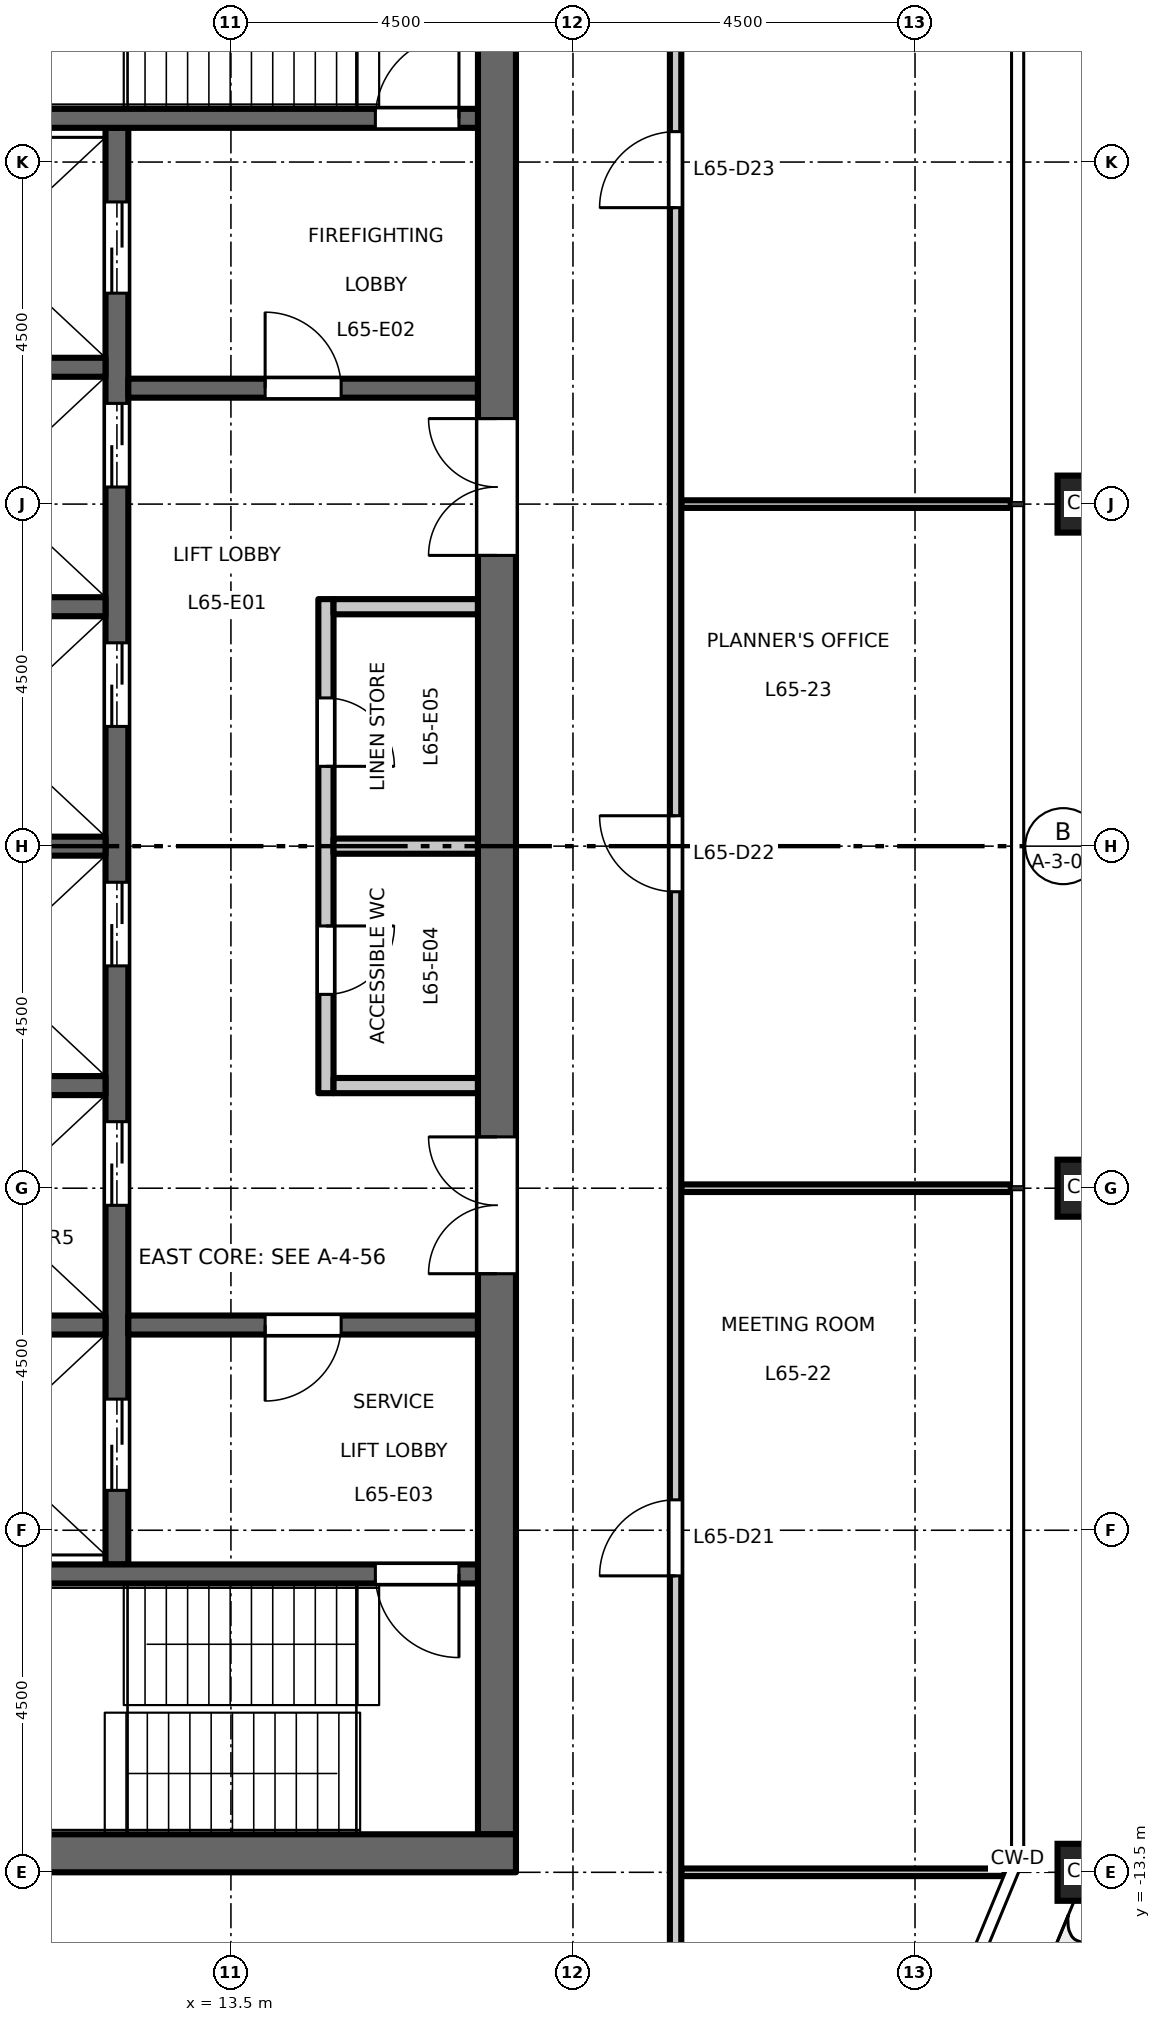
"""IFC4 building model, lengths in metres.
Left out: names, types, materials, properties, quantities, classifications, styles, units other than length and angle.
Written with IfcOpenShell. Run it as: python <this file> out.ifc"""

import sys

from ifc_helpers import new_model, si_unit, direction, frame, frame_2d, origin, origin_2d, place, context, subcontext, project, spatial, rectangle, hollow_rectangle, extrude, element, fill, save


model = new_model("IFC4")
c1 = context("Model", 3, precision=1e-05, world=origin(), true_north=direction((0.0, 1.0)))
c2 = subcontext(c1, "Body", "Model", "MODEL_VIEW")
j1 = project(units=[si_unit("LENGTHUNIT", "METRE"), si_unit("PLANEANGLEUNIT", "RADIAN")], contexts=[c1])
p1 = place(None, origin())
s1 = spatial("IfcSite", under=j1, at=p1, CompositionType="ELEMENT")
p2 = place(p1, origin())
s2 = spatial("IfcBuilding", under=s1, at=p2, CompositionType="ELEMENT")
p3 = place(p2, frame((0.0, 0.0, 303.2)))
s3 = spatial("IfcBuildingStorey", under=s2, at=p3, CompositionType="ELEMENT", Elevation=303.2)
for number, where, z_axis, x_axis in (
    (1, (24.75, -13.5, 0.0), (0.0, 0.0, 1.0), (1.0, 0.0, 0.0)),
    (2, (24.75, -4.5, 0.0), (0.0, 0.0, 1.0), (1.0, 0.0, 0.0)),
    (3, (24.75, 4.5, 0.0), (0.0, 0.0, 1.0), (1.0, 0.0, 0.0)),
):
    element("IfcColumn", number, at=place(p3, frame(where, z_axis=z_axis, x_axis=x_axis)), inside=s3, PredefinedType="COLUMN", context=c2, shape_type="SweptSolid", body=[
        extrude(hollow_rectangle(XDim=0.75, YDim=0.75, WallThickness=0.04, at=origin_2d()), origin(), (0.0, 0.0, 1.0), 4.5),
    ])
p4 = place(p3, frame((14.75, -3.25, 0.0), z_axis=(0.0, 0.0, 1.0), x_axis=(0.0, 1.0, 0.0)))
e4 = element("IfcWall", 4, at=p4, inside=s3, PredefinedType="PARTITIONING", context=c2, shape_type="SweptSolid", body=[
    extrude(rectangle(XDim=6.5, YDim=0.2, at=frame_2d((3.25, 0.0))), origin(), (0.0, 0.0, 1.0), 4.35),
])
p5 = place(p4, frame((1.3, 0.0, 0.0)))
e5 = element("IfcOpeningElement", 5, at=p5, cuts=e4, PredefinedType="OPENING", context=c2, shape_type="SweptSolid", body=[
    extrude(rectangle(XDim=0.9, YDim=2.1, at=frame_2d((0.45, 1.05))), frame((0.0, 0.11, 0.0), z_axis=(0.0, -1.0, 0.0), x_axis=(1.0, 0.0, 0.0)), (0.0, 0.0, 1.0), 0.22),
])
p6 = place(p4, frame((4.3, 0.0, 0.0)))
e6 = element("IfcOpeningElement", 6, at=p6, cuts=e4, PredefinedType="OPENING", context=c2, shape_type="SweptSolid", body=[
    extrude(rectangle(XDim=0.9, YDim=2.1, at=frame_2d((0.45, 1.05))), frame((0.0, 0.11, 0.0), z_axis=(0.0, -1.0, 0.0), x_axis=(1.0, 0.0, 0.0)), (0.0, 0.0, 1.0), 0.22),
])
for number, where, z_axis, x_axis in (
    (7, (14.85, 3.15, 0.0), (0.0, 0.0, 1.0), (1.0, 0.0, 0.0)),
    (8, (14.85, -3.15, 0.0), (0.0, 0.0, 1.0), (1.0, 0.0, 0.0)),
    (9, (14.85, 0.0, 0.0), (0.0, 0.0, 1.0), (1.0, 0.0, 0.0)),
):
    element("IfcWall", number, at=place(p3, frame(where, z_axis=z_axis, x_axis=x_axis)), inside=s3, PredefinedType="PARTITIONING", context=c2, shape_type="SweptSolid", body=[
        extrude(rectangle(XDim=1.9, YDim=0.2, at=frame_2d((0.95, 0.0))), origin(), (0.0, 0.0, 1.0), 4.35),
    ])
p7 = place(p3, frame((12.0, -9.45, 0.0), z_axis=(0.0, 0.0, 1.0), x_axis=(0.0, 1.0, 0.0)))
e10 = element("IfcWall", 10, at=p7, inside=s3, PredefinedType="SHEAR", context=c2, shape_type="SweptSolid", body=[
    extrude(rectangle(XDim=18.9, YDim=0.3, at=frame_2d((9.45, 0.0))), origin(), (0.0, 0.0, 1.0), 4.35),
])
p8 = place(p7, frame((4.725, 0.0, 0.0)))
e11 = element("IfcOpeningElement", 11, at=p8, cuts=e10, PredefinedType="OPENING", context=c2, shape_type="SweptSolid", body=[
    extrude(rectangle(XDim=1.1, YDim=2.1, at=frame_2d((0.55, 1.05))), frame((0.0, 0.16, 0.0), z_axis=(0.0, -1.0, 0.0), x_axis=(1.0, 0.0, 0.0)), (0.0, 0.0, 1.0), 0.32),
])
p9 = place(p7, frame((7.875, 0.0, 0.0)))
e12 = element("IfcOpeningElement", 12, at=p9, cuts=e10, PredefinedType="OPENING", context=c2, shape_type="SweptSolid", body=[
    extrude(rectangle(XDim=1.1, YDim=2.1, at=frame_2d((0.55, 1.05))), frame((0.0, 0.16, 0.0), z_axis=(0.0, -1.0, 0.0), x_axis=(1.0, 0.0, 0.0)), (0.0, 0.0, 1.0), 0.32),
])
p10 = place(p7, frame((11.025, 0.0, 0.0)))
e13 = element("IfcOpeningElement", 13, at=p10, cuts=e10, PredefinedType="OPENING", context=c2, shape_type="SweptSolid", body=[
    extrude(rectangle(XDim=1.1, YDim=2.1, at=frame_2d((0.55, 1.05))), frame((0.0, 0.16, 0.0), z_axis=(0.0, -1.0, 0.0), x_axis=(1.0, 0.0, 0.0)), (0.0, 0.0, 1.0), 0.32),
])
p11 = place(p7, frame((14.175, 0.0, 0.0)))
e14 = element("IfcOpeningElement", 14, at=p11, cuts=e10, PredefinedType="OPENING", context=c2, shape_type="SweptSolid", body=[
    extrude(rectangle(XDim=1.1, YDim=2.1, at=frame_2d((0.55, 1.05))), frame((0.0, 0.16, 0.0), z_axis=(0.0, -1.0, 0.0), x_axis=(1.0, 0.0, 0.0)), (0.0, 0.0, 1.0), 0.32),
])
p12 = place(p7, frame((16.725, 0.0, 0.0)))
e15 = element("IfcOpeningElement", 15, at=p12, cuts=e10, PredefinedType="OPENING", context=c2, shape_type="SweptSolid", body=[
    extrude(rectangle(XDim=1.2, YDim=2.1, at=frame_2d((0.6, 1.05))), frame((0.0, 0.16, 0.0), z_axis=(0.0, -1.0, 0.0), x_axis=(1.0, 0.0, 0.0)), (0.0, 0.0, 1.0), 0.32),
])
p13 = place(p7, frame((0.975, 0.0, 0.0)))
e16 = element("IfcOpeningElement", 16, at=p13, cuts=e10, PredefinedType="OPENING", context=c2, shape_type="SweptSolid", body=[
    extrude(rectangle(XDim=1.2, YDim=2.1, at=frame_2d((0.6, 1.05))), frame((0.0, 0.16, 0.0), z_axis=(0.0, -1.0, 0.0), x_axis=(1.0, 0.0, 0.0)), (0.0, 0.0, 1.0), 0.32),
])
p14 = place(p3, frame((12.15, 6.025, 0.0), z_axis=(0.0, 0.0, 1.0), x_axis=(1.0, 0.0, 0.0)))
e17 = element("IfcWall", 17, at=p14, inside=s3, PredefinedType="SHEAR", context=c2, shape_type="SweptSolid", body=[
    extrude(rectangle(XDim=4.6, YDim=0.25, at=frame_2d((2.3, 0.0))), origin(), (0.0, 0.0, 1.0), 4.35),
])
p15 = place(p14, frame((1.8, 0.0, 0.0)))
e18 = element("IfcOpeningElement", 18, at=p15, cuts=e17, PredefinedType="OPENING", context=c2, shape_type="SweptSolid", body=[
    extrude(rectangle(XDim=1.0, YDim=2.1, at=frame_2d((0.5, 1.05))), frame((0.0, 0.135, 0.0), z_axis=(0.0, -1.0, 0.0), x_axis=(1.0, 0.0, 0.0)), (0.0, 0.0, 1.0), 0.27),
])
p16 = place(p3, frame((12.15, -6.3, 0.0), z_axis=(0.0, 0.0, 1.0), x_axis=(1.0, 0.0, 0.0)))
e19 = element("IfcWall", 19, at=p16, inside=s3, PredefinedType="SHEAR", context=c2, shape_type="SweptSolid", body=[
    extrude(rectangle(XDim=4.6, YDim=0.25, at=frame_2d((2.3, 0.0))), origin(), (0.0, 0.0, 1.0), 4.35),
])
p17 = place(p16, frame((1.8, 0.0, 0.0)))
e20 = element("IfcOpeningElement", 20, at=p17, cuts=e19, PredefinedType="OPENING", context=c2, shape_type="SweptSolid", body=[
    extrude(rectangle(XDim=1.0, YDim=2.1, at=frame_2d((0.5, 1.05))), frame((0.0, 0.135, 0.0), z_axis=(0.0, -1.0, 0.0), x_axis=(1.0, 0.0, 0.0)), (0.0, 0.0, 1.0), 0.27),
])
p18 = place(p3, frame((17.0, -13.0, 0.0), z_axis=(0.0, 0.0, 1.0), x_axis=(0.0, 1.0, 0.0)))
e21 = element("IfcWall", 21, at=p18, inside=s3, PredefinedType="SHEAR", context=c2, shape_type="SweptSolid", body=[
    extrude(rectangle(XDim=26.0, YDim=0.5, at=frame_2d((13.0, 0.0))), origin(), (0.0, 0.0, 1.0), 4.35),
])
p19 = place(p18, frame((16.825, 0.0, 0.0)))
e22 = element("IfcOpeningElement", 22, at=p19, cuts=e21, PredefinedType="OPENING", context=c2, shape_type="SweptSolid", body=[
    extrude(rectangle(XDim=1.8, YDim=2.1, at=frame_2d((0.9, 1.05))), frame((0.0, 0.26, 0.0), z_axis=(0.0, -1.0, 0.0), x_axis=(1.0, 0.0, 0.0)), (0.0, 0.0, 1.0), 0.52),
])
p20 = place(p18, frame((7.375, 0.0, 0.0)))
e23 = element("IfcOpeningElement", 23, at=p20, cuts=e21, PredefinedType="OPENING", context=c2, shape_type="SweptSolid", body=[
    extrude(rectangle(XDim=1.8, YDim=2.1, at=frame_2d((0.9, 1.05))), frame((0.0, 0.26, 0.0), z_axis=(0.0, -1.0, 0.0), x_axis=(1.0, 0.0, 0.0)), (0.0, 0.0, 1.0), 0.52),
])
for number, where, z_axis, x_axis in (
    (24, (8.75, 0.0, 0.0), (0.0, 0.0, 1.0), (1.0, 0.0, 0.0)),
    (25, (8.75, 3.15, 0.0), (0.0, 0.0, 1.0), (1.0, 0.0, 0.0)),
    (26, (8.75, 6.3, 0.0), (0.0, 0.0, 1.0), (1.0, 0.0, 0.0)),
    (27, (8.75, -3.15, 0.0), (0.0, 0.0, 1.0), (1.0, 0.0, 0.0)),
    (28, (8.75, -6.3, 0.0), (0.0, 0.0, 1.0), (1.0, 0.0, 0.0)),
):
    element("IfcWall", number, at=place(p3, frame(where, z_axis=z_axis, x_axis=x_axis)), inside=s3, PredefinedType="SHEAR", context=c2, shape_type="SweptSolid", body=[
        extrude(rectangle(XDim=3.1, YDim=0.25, at=frame_2d((1.55, 0.0))), origin(), (0.0, 0.0, 1.0), 4.35),
    ])
p21 = place(p3, frame((8.75, 9.575, 0.0), z_axis=(0.0, 0.0, 1.0), x_axis=(1.0, 0.0, 0.0)))
e29 = element("IfcWall", 29, at=p21, inside=s3, PredefinedType="SHEAR", context=c2, shape_type="SweptSolid", body=[
    extrude(rectangle(XDim=8.0, YDim=0.25, at=frame_2d((4.0, 0.0))), origin(), (0.0, 0.0, 1.0), 4.35),
])
p22 = place(p21, frame((6.65, 0.0, 0.0)))
e30 = element("IfcOpeningElement", 30, at=p22, cuts=e29, PredefinedType="OPENING", context=c2, shape_type="SweptSolid", body=[
    extrude(rectangle(XDim=1.1, YDim=2.1, at=frame_2d((0.55, 1.05))), frame((0.0, 0.135, 0.0), z_axis=(0.0, -1.0, 0.0), x_axis=(1.0, 0.0, 0.0)), (0.0, 0.0, 1.0), 0.27),
])
p23 = place(p3, frame((8.75, -9.575, 0.0), z_axis=(0.0, 0.0, 1.0), x_axis=(1.0, 0.0, 0.0)))
e31 = element("IfcWall", 31, at=p23, inside=s3, PredefinedType="SHEAR", context=c2, shape_type="SweptSolid", body=[
    extrude(rectangle(XDim=8.0, YDim=0.25, at=frame_2d((4.0, 0.0))), origin(), (0.0, 0.0, 1.0), 4.35),
])
p24 = place(p23, frame((6.65, 0.0, 0.0)))
e32 = element("IfcOpeningElement", 32, at=p24, cuts=e31, PredefinedType="OPENING", context=c2, shape_type="SweptSolid", body=[
    extrude(rectangle(XDim=1.1, YDim=2.1, at=frame_2d((0.55, 1.05))), frame((0.0, 0.135, 0.0), z_axis=(0.0, -1.0, 0.0), x_axis=(1.0, 0.0, 0.0)), (0.0, 0.0, 1.0), 0.27),
])
p25 = place(p3, frame((8.25, -13.25, 0.0), z_axis=(0.0, 0.0, 1.0), x_axis=(1.0, 0.0, 0.0)))
e33 = element("IfcWall", 33, at=p25, inside=s3, PredefinedType="SHEAR", context=c2, shape_type="SweptSolid", body=[
    extrude(rectangle(XDim=9.0, YDim=0.5, at=frame_2d((4.5, 0.0))), origin(), (0.0, 0.0, 1.0), 4.35),
])
p26 = place(p3, frame((19.425, -13.5, 0.0), z_axis=(0.0, 0.0, 1.0), x_axis=(1.0, 0.0, 0.0)))
e34 = element("IfcWall", 34, at=p26, inside=s3, PredefinedType="PARTITIONING", context=c2, shape_type="SweptSolid", body=[
    extrude(rectangle(XDim=4.253, YDim=0.1, at=frame_2d((2.126, 0.0))), origin(), (0.0, 0.0, 1.0), 4.35),
])
for number, where, z_axis, x_axis in (
    (35, (19.425, -4.5, 0.0), (0.0, 0.0, 1.0), (1.0, 0.0, 0.0)),
    (36, (19.425, 4.5, 0.0), (0.0, 0.0, 1.0), (1.0, 0.0, 0.0)),
):
    element("IfcWall", number, at=place(p3, frame(where, z_axis=z_axis, x_axis=x_axis)), inside=s3, PredefinedType="PARTITIONING", context=c2, shape_type="SweptSolid", body=[
        extrude(rectangle(XDim=4.335, YDim=0.1, at=frame_2d((2.167, 0.0))), origin(), (0.0, 0.0, 1.0), 4.35),
    ])
p27 = place(p3, frame((19.35, -15.525, 0.0), z_axis=(0.0, 0.0, 1.0), x_axis=(0.0, 1.0, 0.0)))
e37 = element("IfcWall", 37, at=p27, inside=s3, PredefinedType="PARTITIONING", context=c2, shape_type="SweptSolid", body=[
    extrude(rectangle(XDim=31.05, YDim=0.15, at=frame_2d((15.525, 0.0))), origin(), (0.0, 0.0, 1.0), 4.35),
])
p28 = place(p27, frame((29.675, 0.0, 0.0)))
e38 = element("IfcOpeningElement", 38, at=p28, cuts=e37, PredefinedType="OPENING", context=c2, shape_type="SweptSolid", body=[
    extrude(rectangle(XDim=1.0, YDim=2.1, at=frame_2d((0.5, 1.05))), frame((0.0, 0.085, 0.0), z_axis=(0.0, -1.0, 0.0), x_axis=(1.0, 0.0, 0.0)), (0.0, 0.0, 1.0), 0.17),
])
p29 = place(p27, frame((5.925, 0.0, 0.0)))
e39 = element("IfcOpeningElement", 39, at=p29, cuts=e37, PredefinedType="OPENING", context=c2, shape_type="SweptSolid", body=[
    extrude(rectangle(XDim=1.0, YDim=2.1, at=frame_2d((0.5, 1.05))), frame((0.0, 0.085, 0.0), z_axis=(0.0, -1.0, 0.0), x_axis=(1.0, 0.0, 0.0)), (0.0, 0.0, 1.0), 0.17),
])
p30 = place(p27, frame((14.925, 0.0, 0.0)))
e40 = element("IfcOpeningElement", 40, at=p30, cuts=e37, PredefinedType="OPENING", context=c2, shape_type="SweptSolid", body=[
    extrude(rectangle(XDim=1.0, YDim=2.1, at=frame_2d((0.5, 1.05))), frame((0.0, 0.085, 0.0), z_axis=(0.0, -1.0, 0.0), x_axis=(1.0, 0.0, 0.0)), (0.0, 0.0, 1.0), 0.17),
])
p31 = place(p27, frame((23.925, 0.0, 0.0)))
e41 = element("IfcOpeningElement", 41, at=p31, cuts=e37, PredefinedType="OPENING", context=c2, shape_type="SweptSolid", body=[
    extrude(rectangle(XDim=1.0, YDim=2.1, at=frame_2d((0.5, 1.05))), frame((0.0, 0.085, 0.0), z_axis=(0.0, -1.0, 0.0), x_axis=(1.0, 0.0, 0.0)), (0.0, 0.0, 1.0), 0.17),
])
p32 = place(p15, origin())
e42 = element("IfcDoor", 42, at=p32, inside=s3, OperationType="SINGLE_SWING_RIGHT", PredefinedType="DOOR", context=c2, shape_type="SweptSolid", body=[
    extrude(rectangle(XDim=1.0, YDim=2.1, at=frame_2d((0.5, 1.05))), frame((0.0, 0.025, 0.0), z_axis=(0.0, -1.0, 0.0), x_axis=(1.0, 0.0, 0.0)), (0.0, 0.0, 1.0), 0.05),
])
fill(e18, e42)
p33 = place(p17, origin())
e43 = element("IfcDoor", 43, at=p33, inside=s3, OperationType="SINGLE_SWING_LEFT", PredefinedType="DOOR", context=c2, shape_type="SweptSolid", body=[
    extrude(rectangle(XDim=1.0, YDim=2.1, at=frame_2d((0.5, 1.05))), frame((0.0, 0.025, 0.0), z_axis=(0.0, -1.0, 0.0), x_axis=(1.0, 0.0, 0.0)), (0.0, 0.0, 1.0), 0.05),
])
fill(e20, e43)
p34 = place(p22, origin())
e44 = element("IfcDoor", 44, at=p34, inside=s3, OperationType="SINGLE_SWING_LEFT", PredefinedType="DOOR", context=c2, shape_type="SweptSolid", body=[
    extrude(rectangle(XDim=1.1, YDim=2.1, at=frame_2d((0.55, 1.05))), frame((0.0, 0.025, 0.0), z_axis=(0.0, -1.0, 0.0), x_axis=(1.0, 0.0, 0.0)), (0.0, 0.0, 1.0), 0.05),
])
fill(e30, e44)
p35 = place(p24, origin())
e45 = element("IfcDoor", 45, at=p35, inside=s3, OperationType="SINGLE_SWING_RIGHT", PredefinedType="DOOR", context=c2, shape_type="SweptSolid", body=[
    extrude(rectangle(XDim=1.1, YDim=2.1, at=frame_2d((0.55, 1.05))), frame((0.0, 0.025, 0.0), z_axis=(0.0, -1.0, 0.0), x_axis=(1.0, 0.0, 0.0)), (0.0, 0.0, 1.0), 0.05),
])
fill(e32, e45)
p36 = place(p19, origin())
e46 = element("IfcDoor", 46, at=p36, inside=s3, OperationType="DOUBLE_DOOR_DOUBLE_SWING", PredefinedType="DOOR", context=c2, shape_type="SweptSolid", body=[
    extrude(rectangle(XDim=1.8, YDim=2.1, at=frame_2d((0.9, 1.05))), frame((0.0, 0.025, 0.0), z_axis=(0.0, -1.0, 0.0), x_axis=(1.0, 0.0, 0.0)), (0.0, 0.0, 1.0), 0.05),
])
fill(e22, e46)
p37 = place(p20, origin())
e47 = element("IfcDoor", 47, at=p37, inside=s3, OperationType="DOUBLE_DOOR_DOUBLE_SWING", PredefinedType="DOOR", context=c2, shape_type="SweptSolid", body=[
    extrude(rectangle(XDim=1.8, YDim=2.1, at=frame_2d((0.9, 1.05))), frame((0.0, 0.025, 0.0), z_axis=(0.0, -1.0, 0.0), x_axis=(1.0, 0.0, 0.0)), (0.0, 0.0, 1.0), 0.05),
])
fill(e23, e47)
p38 = place(p8, origin())
e48 = element("IfcDoor", 48, at=p38, inside=s3, OperationType="DOUBLE_DOOR_SLIDING", PredefinedType="DOOR", context=c2, shape_type="SweptSolid", body=[
    extrude(rectangle(XDim=1.1, YDim=2.1, at=frame_2d((0.55, 1.05))), frame((0.0, 0.025, 0.0), z_axis=(0.0, -1.0, 0.0), x_axis=(1.0, 0.0, 0.0)), (0.0, 0.0, 1.0), 0.05),
])
fill(e11, e48)
p39 = place(p9, origin())
e49 = element("IfcDoor", 49, at=p39, inside=s3, OperationType="DOUBLE_DOOR_SLIDING", PredefinedType="DOOR", context=c2, shape_type="SweptSolid", body=[
    extrude(rectangle(XDim=1.1, YDim=2.1, at=frame_2d((0.55, 1.05))), frame((0.0, 0.025, 0.0), z_axis=(0.0, -1.0, 0.0), x_axis=(1.0, 0.0, 0.0)), (0.0, 0.0, 1.0), 0.05),
])
fill(e12, e49)
p40 = place(p10, origin())
e50 = element("IfcDoor", 50, at=p40, inside=s3, OperationType="DOUBLE_DOOR_SLIDING", PredefinedType="DOOR", context=c2, shape_type="SweptSolid", body=[
    extrude(rectangle(XDim=1.1, YDim=2.1, at=frame_2d((0.55, 1.05))), frame((0.0, 0.025, 0.0), z_axis=(0.0, -1.0, 0.0), x_axis=(1.0, 0.0, 0.0)), (0.0, 0.0, 1.0), 0.05),
])
fill(e13, e50)
p41 = place(p11, origin())
e51 = element("IfcDoor", 51, at=p41, inside=s3, OperationType="DOUBLE_DOOR_SLIDING", PredefinedType="DOOR", context=c2, shape_type="SweptSolid", body=[
    extrude(rectangle(XDim=1.1, YDim=2.1, at=frame_2d((0.55, 1.05))), frame((0.0, 0.025, 0.0), z_axis=(0.0, -1.0, 0.0), x_axis=(1.0, 0.0, 0.0)), (0.0, 0.0, 1.0), 0.05),
])
fill(e14, e51)
p42 = place(p12, origin())
e52 = element("IfcDoor", 52, at=p42, inside=s3, OperationType="DOUBLE_DOOR_SLIDING", PredefinedType="DOOR", context=c2, shape_type="SweptSolid", body=[
    extrude(rectangle(XDim=1.2, YDim=2.1, at=frame_2d((0.6, 1.05))), frame((0.0, 0.025, 0.0), z_axis=(0.0, -1.0, 0.0), x_axis=(1.0, 0.0, 0.0)), (0.0, 0.0, 1.0), 0.05),
])
fill(e15, e52)
p43 = place(p13, origin())
e53 = element("IfcDoor", 53, at=p43, inside=s3, OperationType="DOUBLE_DOOR_SLIDING", PredefinedType="DOOR", context=c2, shape_type="SweptSolid", body=[
    extrude(rectangle(XDim=1.2, YDim=2.1, at=frame_2d((0.6, 1.05))), frame((0.0, 0.025, 0.0), z_axis=(0.0, -1.0, 0.0), x_axis=(1.0, 0.0, 0.0)), (0.0, 0.0, 1.0), 0.05),
])
fill(e16, e53)
p44 = place(p5, origin())
e54 = element("IfcDoor", 54, at=p44, inside=s3, OperationType="SINGLE_SWING_RIGHT", PredefinedType="DOOR", context=c2, shape_type="SweptSolid", body=[
    extrude(rectangle(XDim=0.9, YDim=2.1, at=frame_2d((0.45, 1.05))), frame((0.0, 0.025, 0.0), z_axis=(0.0, -1.0, 0.0), x_axis=(1.0, 0.0, 0.0)), (0.0, 0.0, 1.0), 0.05),
])
fill(e5, e54)
p45 = place(p6, origin())
e55 = element("IfcDoor", 55, at=p45, inside=s3, OperationType="SINGLE_SWING_LEFT", PredefinedType="DOOR", context=c2, shape_type="SweptSolid", body=[
    extrude(rectangle(XDim=0.9, YDim=2.1, at=frame_2d((0.45, 1.05))), frame((0.0, 0.025, 0.0), z_axis=(0.0, -1.0, 0.0), x_axis=(1.0, 0.0, 0.0)), (0.0, 0.0, 1.0), 0.05),
])
fill(e6, e55)
p46 = place(p29, origin())
e56 = element("IfcDoor", 56, at=p46, inside=s3, OperationType="SINGLE_SWING_LEFT", PredefinedType="DOOR", context=c2, shape_type="SweptSolid", body=[
    extrude(rectangle(XDim=1.0, YDim=2.1, at=frame_2d((0.5, 1.05))), frame((0.0, 0.025, 0.0), z_axis=(0.0, -1.0, 0.0), x_axis=(1.0, 0.0, 0.0)), (0.0, 0.0, 1.0), 0.05),
])
fill(e39, e56)
p47 = place(p30, origin())
e57 = element("IfcDoor", 57, at=p47, inside=s3, OperationType="SINGLE_SWING_RIGHT", PredefinedType="DOOR", context=c2, shape_type="SweptSolid", body=[
    extrude(rectangle(XDim=1.0, YDim=2.1, at=frame_2d((0.5, 1.05))), frame((0.0, 0.025, 0.0), z_axis=(0.0, -1.0, 0.0), x_axis=(1.0, 0.0, 0.0)), (0.0, 0.0, 1.0), 0.05),
])
fill(e40, e57)
p48 = place(p31, origin())
e58 = element("IfcDoor", 58, at=p48, inside=s3, OperationType="SINGLE_SWING_LEFT", PredefinedType="DOOR", context=c2, shape_type="SweptSolid", body=[
    extrude(rectangle(XDim=1.0, YDim=2.1, at=frame_2d((0.5, 1.05))), frame((0.0, 0.025, 0.0), z_axis=(0.0, -1.0, 0.0), x_axis=(1.0, 0.0, 0.0)), (0.0, 0.0, 1.0), 0.05),
])
fill(e41, e58)
save(model, sys.argv[1])
